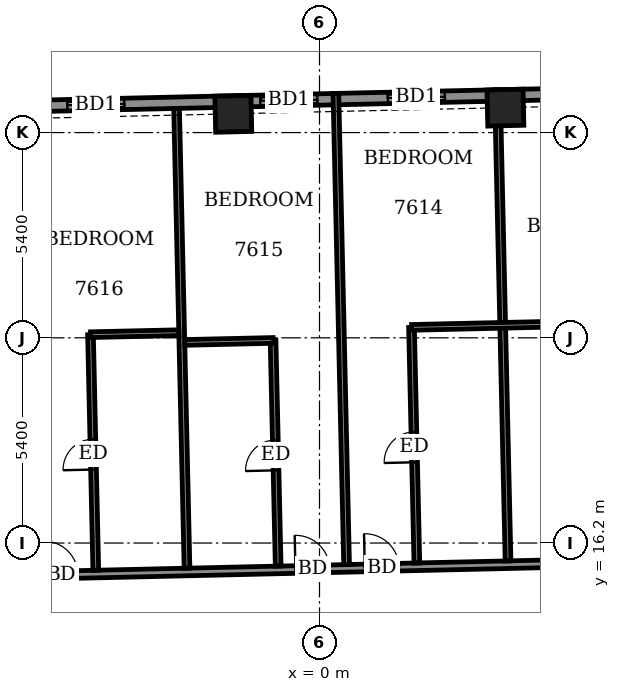
"""IFC4 building model, lengths in metres.
Left out: names, types, materials, properties, quantities, classifications, styles, units other than length and angle.
Written with IfcOpenShell. Run it as: python <this file> out.ifc"""

import sys

from ifc_helpers import new_model, si_unit, direction, frame, frame_2d, origin, origin_2d, place, context, subcontext, project, spatial, rectangle, extrude, element, fill, save


model = new_model("IFC4")
c1 = context("Model", 3, precision=1e-05, world=origin(), true_north=direction((0.0, 1.0)))
c2 = subcontext(c1, "Body", "Model", "MODEL_VIEW")
j1 = project(units=[si_unit("LENGTHUNIT", "METRE"), si_unit("PLANEANGLEUNIT", "RADIAN")], contexts=[c1])
p1 = place(None, origin())
s1 = spatial("IfcSite", under=j1, at=p1, CompositionType="ELEMENT")
p2 = place(p1, origin())
s2 = spatial("IfcBuilding", under=s1, at=p2, CompositionType="ELEMENT")
p3 = place(p2, frame((0.0, 0.0, 297.9)))
s3 = spatial("IfcBuildingStorey", under=s2, at=p3, CompositionType="ELEMENT", Elevation=297.9)
for number, where, z_axis, x_axis in (
    (1, (4.892, 27.656, -0.55), (0.0, 0.0, 1.0), (-1.0, -0.023, 0.0)),
    (2, (-2.268, 27.494, -0.55), (0.0, 0.0, 1.0), (-1.0, -0.023, 0.0)),
):
    element("IfcColumn", number, at=place(p3, frame(where, z_axis=z_axis, x_axis=x_axis)), inside=s3, PredefinedType="COLUMN", context=c2, shape_type="SweptSolid", body=[
        extrude(rectangle(XDim=0.95, YDim=0.95, at=origin_2d()), origin(), (0.0, 0.0, 1.0), 3.6),
    ])
p4 = place(p3, frame((26.216, 28.465, 0.0), z_axis=(0.0, 0.0, 1.0), x_axis=(-0.999742843677, -0.022677004157, 0.0)))
e3 = element("IfcWall", 3, at=p4, inside=s3, PredefinedType="SOLIDWALL", context=c2, shape_type="SweptSolid", body=[
    extrude(rectangle(XDim=49.836, YDim=0.3, at=frame_2d((24.918, 0.0))), origin(), (0.0, 0.0, 1.0), 2.5),
])
p5 = place(p4, frame((1.763, 0.0, 0.0)))
e4 = element("IfcOpeningElement", 4, at=p5, cuts=e3, PredefinedType="OPENING", context=c2, shape_type="SweptSolid", body=[
    extrude(rectangle(XDim=1.5, YDim=2.4, at=frame_2d((0.75, 1.2))), frame((0.0, 0.16, 0.0), z_axis=(0.0, -1.0, 0.0), x_axis=(1.0, 0.0, 0.0)), (0.0, 0.0, 1.0), 0.32),
])
p6 = place(p4, frame((4.912, 0.0, 0.0)))
e5 = element("IfcOpeningElement", 5, at=p6, cuts=e3, PredefinedType="OPENING", context=c2, shape_type="SweptSolid", body=[
    extrude(rectangle(XDim=1.5, YDim=2.4, at=frame_2d((0.75, 1.2))), frame((0.0, 0.16, 0.0), z_axis=(0.0, -1.0, 0.0), x_axis=(1.0, 0.0, 0.0)), (0.0, 0.0, 1.0), 0.32),
])
p7 = place(p4, frame((10.186, 0.0, 0.0)))
e6 = element("IfcOpeningElement", 6, at=p7, cuts=e3, PredefinedType="OPENING", context=c2, shape_type="SweptSolid", body=[
    extrude(rectangle(XDim=1.5, YDim=2.4, at=frame_2d((0.75, 1.2))), frame((0.0, 0.16, 0.0), z_axis=(0.0, -1.0, 0.0), x_axis=(1.0, 0.0, 0.0)), (0.0, 0.0, 1.0), 0.32),
])
p8 = place(p4, frame((15.093, 0.0, 0.0)))
e7 = element("IfcOpeningElement", 7, at=p8, cuts=e3, PredefinedType="OPENING", context=c2, shape_type="SweptSolid", body=[
    extrude(rectangle(XDim=1.5, YDim=2.4, at=frame_2d((0.75, 1.2))), frame((0.0, 0.16, 0.0), z_axis=(0.0, -1.0, 0.0), x_axis=(1.0, 0.0, 0.0)), (0.0, 0.0, 1.0), 0.32),
])
p9 = place(p4, frame((18.449, 0.0, 0.0)))
e8 = element("IfcOpeningElement", 8, at=p9, cuts=e3, PredefinedType="OPENING", context=c2, shape_type="SweptSolid", body=[
    extrude(rectangle(XDim=1.5, YDim=2.4, at=frame_2d((0.75, 1.2))), frame((0.0, 0.16, 0.0), z_axis=(0.0, -1.0, 0.0), x_axis=(1.0, 0.0, 0.0)), (0.0, 0.0, 1.0), 0.32),
])
p10 = place(p4, frame((22.924, 0.0, 0.0)))
e9 = element("IfcOpeningElement", 9, at=p10, cuts=e3, PredefinedType="OPENING", context=c2, shape_type="SweptSolid", body=[
    extrude(rectangle(XDim=1.5, YDim=2.4, at=frame_2d((0.75, 1.2))), frame((0.0, 0.16, 0.0), z_axis=(0.0, -1.0, 0.0), x_axis=(1.0, 0.0, 0.0)), (0.0, 0.0, 1.0), 0.32),
])
p11 = place(p4, frame((26.28, 0.0, 0.0)))
e10 = element("IfcOpeningElement", 10, at=p11, cuts=e3, PredefinedType="OPENING", context=c2, shape_type="SweptSolid", body=[
    extrude(rectangle(XDim=1.5, YDim=2.4, at=frame_2d((0.75, 1.2))), frame((0.0, 0.16, 0.0), z_axis=(0.0, -1.0, 0.0), x_axis=(1.0, 0.0, 0.0)), (0.0, 0.0, 1.0), 0.32),
])
p12 = place(p4, frame((31.361, 0.0, 0.0)))
e11 = element("IfcOpeningElement", 11, at=p12, cuts=e3, PredefinedType="OPENING", context=c2, shape_type="SweptSolid", body=[
    extrude(rectangle(XDim=1.5, YDim=2.4, at=frame_2d((0.75, 1.2))), frame((0.0, 0.16, 0.0), z_axis=(0.0, -1.0, 0.0), x_axis=(1.0, 0.0, 0.0)), (0.0, 0.0, 1.0), 0.32),
])
p13 = place(p4, frame((36.437, 0.0, 0.0)))
e12 = element("IfcOpeningElement", 12, at=p13, cuts=e3, PredefinedType="OPENING", context=c2, shape_type="SweptSolid", body=[
    extrude(rectangle(XDim=1.5, YDim=2.4, at=frame_2d((0.75, 1.2))), frame((0.0, 0.16, 0.0), z_axis=(0.0, -1.0, 0.0), x_axis=(1.0, 0.0, 0.0)), (0.0, 0.0, 1.0), 0.32),
])
p14 = place(p4, frame((39.793, 0.0, 0.0)))
e13 = element("IfcOpeningElement", 13, at=p14, cuts=e3, PredefinedType="OPENING", context=c2, shape_type="SweptSolid", body=[
    extrude(rectangle(XDim=1.5, YDim=2.4, at=frame_2d((0.75, 1.2))), frame((0.0, 0.16, 0.0), z_axis=(0.0, -1.0, 0.0), x_axis=(1.0, 0.0, 0.0)), (0.0, 0.0, 1.0), 0.32),
])
p15 = place(p4, frame((44.267, 0.0, 0.0)))
e14 = element("IfcOpeningElement", 14, at=p15, cuts=e3, PredefinedType="OPENING", context=c2, shape_type="SweptSolid", body=[
    extrude(rectangle(XDim=1.5, YDim=2.4, at=frame_2d((0.75, 1.2))), frame((0.0, 0.16, 0.0), z_axis=(0.0, -1.0, 0.0), x_axis=(1.0, 0.0, 0.0)), (0.0, 0.0, 1.0), 0.32),
])
p16 = place(p4, frame((47.524, 0.0, 0.9)))
e15 = element("IfcOpeningElement", 15, at=p16, cuts=e3, PredefinedType="OPENING", context=c2, shape_type="SweptSolid", body=[
    extrude(rectangle(XDim=1.2, YDim=1.5, at=frame_2d((0.6, 0.75))), frame((0.0, 0.16, 0.0), z_axis=(0.0, -1.0, 0.0), x_axis=(1.0, 0.0, 0.0)), (0.0, 0.0, 1.0), 0.32),
])
p17 = place(p3, frame((-26.401, 14.918, 0.0), z_axis=(0.0, 0.0, 1.0), x_axis=(0.99974239733, 0.022696673341, 0.0)))
e16 = element("IfcWall", 16, at=p17, inside=s3, PredefinedType="PARTITIONING", context=c2, shape_type="SweptSolid", body=[
    extrude(rectangle(XDim=55.386, YDim=0.2, at=frame_2d((27.693, 0.0))), origin(), (0.0, 0.0, 1.0), 3.05),
])
p18 = place(p17, frame((53.718, 0.0, 0.0)))
e17 = element("IfcOpeningElement", 17, at=p18, cuts=e16, PredefinedType="OPENING", context=c2, shape_type="SweptSolid", body=[
    extrude(rectangle(XDim=1.0, YDim=2.1, at=frame_2d((0.5, 1.05))), frame((0.0, 0.11, 0.0), z_axis=(0.0, -1.0, 0.0), x_axis=(1.0, 0.0, 0.0)), (0.0, 0.0, 1.0), 0.22),
])
p19 = place(p17, frame((49.325, 0.0, 0.0)))
e18 = element("IfcOpeningElement", 18, at=p19, cuts=e16, PredefinedType="OPENING", context=c2, shape_type="SweptSolid", body=[
    extrude(rectangle(XDim=0.9, YDim=2.1, at=frame_2d((0.45, 1.05))), frame((0.0, 0.11, 0.0), z_axis=(0.0, -1.0, 0.0), x_axis=(1.0, 0.0, 0.0)), (0.0, 0.0, 1.0), 0.22),
])
p20 = place(p17, frame((44.575, 0.0, 0.0)))
e19 = element("IfcOpeningElement", 19, at=p20, cuts=e16, PredefinedType="OPENING", context=c2, shape_type="SweptSolid", body=[
    extrude(rectangle(XDim=0.9, YDim=2.1, at=frame_2d((0.45, 1.05))), frame((0.0, 0.11, 0.0), z_axis=(0.0, -1.0, 0.0), x_axis=(1.0, 0.0, 0.0)), (0.0, 0.0, 1.0), 0.22),
])
p21 = place(p17, frame((42.725, 0.0, 0.0)))
e20 = element("IfcOpeningElement", 20, at=p21, cuts=e16, PredefinedType="OPENING", context=c2, shape_type="SweptSolid", body=[
    extrude(rectangle(XDim=0.9, YDim=2.1, at=frame_2d((0.45, 1.05))), frame((0.0, 0.11, 0.0), z_axis=(0.0, -1.0, 0.0), x_axis=(1.0, 0.0, 0.0)), (0.0, 0.0, 1.0), 0.22),
])
p22 = place(p17, frame((36.1, 0.0, 0.0)))
e21 = element("IfcOpeningElement", 21, at=p22, cuts=e16, PredefinedType="OPENING", context=c2, shape_type="SweptSolid", body=[
    extrude(rectangle(XDim=0.9, YDim=2.1, at=frame_2d((0.45, 1.05))), frame((0.0, 0.11, 0.0), z_axis=(0.0, -1.0, 0.0), x_axis=(1.0, 0.0, 0.0)), (0.0, 0.0, 1.0), 0.22),
])
p23 = place(p17, frame((34.25, 0.0, 0.0)))
e22 = element("IfcOpeningElement", 22, at=p23, cuts=e16, PredefinedType="OPENING", context=c2, shape_type="SweptSolid", body=[
    extrude(rectangle(XDim=0.9, YDim=2.1, at=frame_2d((0.45, 1.05))), frame((0.0, 0.11, 0.0), z_axis=(0.0, -1.0, 0.0), x_axis=(1.0, 0.0, 0.0)), (0.0, 0.0, 1.0), 0.22),
])
p24 = place(p17, frame((27.6, 0.0, 0.0)))
e23 = element("IfcOpeningElement", 23, at=p24, cuts=e16, PredefinedType="OPENING", context=c2, shape_type="SweptSolid", body=[
    extrude(rectangle(XDim=0.9, YDim=2.1, at=frame_2d((0.45, 1.05))), frame((0.0, 0.11, 0.0), z_axis=(0.0, -1.0, 0.0), x_axis=(1.0, 0.0, 0.0)), (0.0, 0.0, 1.0), 0.22),
])
p25 = place(p17, frame((25.775, 0.0, 0.0)))
e24 = element("IfcOpeningElement", 24, at=p25, cuts=e16, PredefinedType="OPENING", context=c2, shape_type="SweptSolid", body=[
    extrude(rectangle(XDim=0.9, YDim=2.1, at=frame_2d((0.45, 1.05))), frame((0.0, 0.11, 0.0), z_axis=(0.0, -1.0, 0.0), x_axis=(1.0, 0.0, 0.0)), (0.0, 0.0, 1.0), 0.22),
])
p26 = place(p17, frame((19.15, 0.0, 0.0)))
e25 = element("IfcOpeningElement", 25, at=p26, cuts=e16, PredefinedType="OPENING", context=c2, shape_type="SweptSolid", body=[
    extrude(rectangle(XDim=0.9, YDim=2.1, at=frame_2d((0.45, 1.05))), frame((0.0, 0.11, 0.0), z_axis=(0.0, -1.0, 0.0), x_axis=(1.0, 0.0, 0.0)), (0.0, 0.0, 1.0), 0.22),
])
p27 = place(p17, frame((17.3, 0.0, 0.0)))
e26 = element("IfcOpeningElement", 26, at=p27, cuts=e16, PredefinedType="OPENING", context=c2, shape_type="SweptSolid", body=[
    extrude(rectangle(XDim=0.9, YDim=2.1, at=frame_2d((0.45, 1.05))), frame((0.0, 0.11, 0.0), z_axis=(0.0, -1.0, 0.0), x_axis=(1.0, 0.0, 0.0)), (0.0, 0.0, 1.0), 0.22),
])
p28 = place(p17, frame((10.65, 0.0, 0.0)))
e27 = element("IfcOpeningElement", 27, at=p28, cuts=e16, PredefinedType="OPENING", context=c2, shape_type="SweptSolid", body=[
    extrude(rectangle(XDim=0.9, YDim=2.1, at=frame_2d((0.45, 1.05))), frame((0.0, 0.11, 0.0), z_axis=(0.0, -1.0, 0.0), x_axis=(1.0, 0.0, 0.0)), (0.0, 0.0, 1.0), 0.22),
])
p29 = place(p17, frame((8.8, 0.0, 0.0)))
e28 = element("IfcOpeningElement", 28, at=p29, cuts=e16, PredefinedType="OPENING", context=c2, shape_type="SweptSolid", body=[
    extrude(rectangle(XDim=0.9, YDim=2.1, at=frame_2d((0.45, 1.05))), frame((0.0, 0.11, 0.0), z_axis=(0.0, -1.0, 0.0), x_axis=(1.0, 0.0, 0.0)), (0.0, 0.0, 1.0), 0.22),
])
p30 = place(p17, frame((1.864, 0.0, 0.0)))
e29 = element("IfcOpeningElement", 29, at=p30, cuts=e16, PredefinedType="OPENING", context=c2, shape_type="SweptSolid", body=[
    extrude(rectangle(XDim=1.0, YDim=2.1, at=frame_2d((0.5, 1.05))), frame((0.0, 0.11, 0.0), z_axis=(0.0, -1.0, 0.0), x_axis=(1.0, 0.0, 0.0)), (0.0, 0.0, 1.0), 0.22),
])
p31 = place(p3, frame((-5.886, 15.484, 0.0), z_axis=(0.0, 0.0, 1.0), x_axis=(-0.022564860101, 0.999745381129, 0.0)))
e30 = element("IfcWall", 30, at=p31, inside=s3, PredefinedType="PARTITIONING", context=c2, shape_type="SweptSolid", body=[
    extrude(rectangle(XDim=6.199, YDim=0.15, at=frame_2d((3.1, 0.0))), origin(), (0.0, 0.0, 1.0), 3.05),
])
p32 = place(p31, frame((2.65, 0.0, 0.0)))
e31 = element("IfcOpeningElement", 31, at=p32, cuts=e30, PredefinedType="OPENING", context=c2, shape_type="SweptSolid", body=[
    extrude(rectangle(XDim=0.8, YDim=2.1, at=frame_2d((0.4, 1.05))), frame((0.0, 0.085, 0.0), z_axis=(0.0, -1.0, 0.0), x_axis=(1.0, 0.0, 0.0)), (0.0, 0.0, 1.0), 0.17),
])
p33 = place(p3, frame((-3.486, 15.538, 0.0), z_axis=(0.0, 0.0, 1.0), x_axis=(-0.022719113715, 0.999741887625, 0.0)))
e32 = element("IfcWall", 32, at=p33, inside=s3, PredefinedType="PARTITIONING", context=c2, shape_type="SweptSolid", body=[
    extrude(rectangle(XDim=12.1, YDim=0.15, at=frame_2d((6.05, 0.0))), origin(), (0.0, 0.0, 1.0), 2.5),
])
p34 = place(p3, frame((-1.087, 15.593, 0.0), z_axis=(0.0, 0.0, 1.0), x_axis=(-0.022730742442, 0.999741623295, 0.0)))
e33 = element("IfcWall", 33, at=p34, inside=s3, PredefinedType="PARTITIONING", context=c2, shape_type="SweptSolid", body=[
    extrude(rectangle(XDim=5.939, YDim=0.15, at=frame_2d((2.97, 0.0))), origin(), (0.0, 0.0, 1.0), 3.05),
])
p35 = place(p34, frame((2.52, 0.0, 0.0)))
e34 = element("IfcOpeningElement", 34, at=p35, cuts=e33, PredefinedType="OPENING", context=c2, shape_type="SweptSolid", body=[
    extrude(rectangle(XDim=0.8, YDim=2.1, at=frame_2d((0.4, 1.05))), frame((0.0, 0.085, 0.0), z_axis=(0.0, -1.0, 0.0), x_axis=(1.0, 0.0, 0.0)), (0.0, 0.0, 1.0), 0.17),
])
p36 = place(p3, frame((0.713, 15.633, 0.0), z_axis=(0.0, 0.0, 1.0), x_axis=(-0.022740189192, 0.999741408463, 0.0)))
e35 = element("IfcWall", 35, at=p36, inside=s3, PredefinedType="PARTITIONING", context=c2, shape_type="SweptSolid", body=[
    extrude(rectangle(XDim=12.4, YDim=0.15, at=frame_2d((6.2, 0.0))), origin(), (0.0, 0.0, 1.0), 2.5),
])
p37 = place(p3, frame((2.562, 15.675, 0.0), z_axis=(0.0, 0.0, 1.0), x_axis=(-0.02275807565, 0.999741001456, 0.0)))
e36 = element("IfcWall", 36, at=p37, inside=s3, PredefinedType="PARTITIONING", context=c2, shape_type="SweptSolid", body=[
    extrude(rectangle(XDim=6.201, YDim=0.15, at=frame_2d((3.1, 0.0))), origin(), (0.0, 0.0, 1.0), 3.05),
])
p38 = place(p37, frame((2.65, 0.0, 0.0)))
e37 = element("IfcOpeningElement", 37, at=p38, cuts=e36, PredefinedType="OPENING", context=c2, shape_type="SweptSolid", body=[
    extrude(rectangle(XDim=0.8, YDim=2.1, at=frame_2d((0.4, 1.05))), frame((0.0, 0.085, 0.0), z_axis=(0.0, -1.0, 0.0), x_axis=(1.0, 0.0, 0.0)), (0.0, 0.0, 1.0), 0.17),
])
p39 = place(p3, frame((4.961, 15.73, 0.0), z_axis=(0.0, 0.0, 1.0), x_axis=(-0.022661475803, 0.999743195783, 0.0)))
e38 = element("IfcWall", 38, at=p39, inside=s3, PredefinedType="PARTITIONING", context=c2, shape_type="SweptSolid", body=[
    extrude(rectangle(XDim=12.4, YDim=0.15, at=frame_2d((6.2, 0.0))), origin(), (0.0, 0.0, 1.0), 3.05),
])
for number, where, z_axis, x_axis in (
    (39, (-3.544, 21.478, 0.0), (0.0, 0.0, 1.0), (1.0, 0.023, 0.0)),
    (40, (-6.024, 21.682, 0.0), (0.0, 0.0, 1.0), (1.0, 0.023, 0.0)),
):
    element("IfcWall", number, at=place(p3, frame(where, z_axis=z_axis, x_axis=x_axis)), inside=s3, PredefinedType="PARTITIONING", context=c2, shape_type="SweptSolid", body=[
        extrude(rectangle(XDim=2.324, YDim=0.15, at=frame_2d((1.162, 0.0))), origin(), (0.0, 0.0, 1.0), 3.05),
    ])
p40 = place(p3, frame((2.423, 21.874, 0.0), z_axis=(0.0, 0.0, 1.0), x_axis=(0.999742675121, 0.022684433919, 0.0)))
e41 = element("IfcWall", 41, at=p40, inside=s3, PredefinedType="PARTITIONING", context=c2, shape_type="SweptSolid", body=[
    extrude(rectangle(XDim=4.8, YDim=0.15, at=frame_2d((2.4, 0.0))), origin(), (0.0, 0.0, 1.0), 3.05),
])
p41 = place(p10, origin())
e42 = element("IfcDoor", 42, at=p41, inside=s3, OperationType="SLIDING_TO_LEFT", PredefinedType="DOOR", context=c2, shape_type="SweptSolid", body=[
    extrude(rectangle(XDim=1.5, YDim=2.4, at=frame_2d((0.75, 1.2))), frame((0.0, 0.025, 0.0), z_axis=(0.0, -1.0, 0.0), x_axis=(1.0, 0.0, 0.0)), (0.0, 0.0, 1.0), 0.05),
])
fill(e9, e42)
p42 = place(p11, origin())
e43 = element("IfcDoor", 43, at=p42, inside=s3, OperationType="SLIDING_TO_LEFT", PredefinedType="DOOR", context=c2, shape_type="SweptSolid", body=[
    extrude(rectangle(XDim=1.5, YDim=2.4, at=frame_2d((0.75, 1.2))), frame((0.0, 0.025, 0.0), z_axis=(0.0, -1.0, 0.0), x_axis=(1.0, 0.0, 0.0)), (0.0, 0.0, 1.0), 0.05),
])
fill(e10, e43)
p43 = place(p12, origin())
e44 = element("IfcDoor", 44, at=p43, inside=s3, OperationType="SLIDING_TO_LEFT", PredefinedType="DOOR", context=c2, shape_type="SweptSolid", body=[
    extrude(rectangle(XDim=1.5, YDim=2.4, at=frame_2d((0.75, 1.2))), frame((0.0, 0.025, 0.0), z_axis=(0.0, -1.0, 0.0), x_axis=(1.0, 0.0, 0.0)), (0.0, 0.0, 1.0), 0.05),
])
fill(e11, e44)
p44 = place(p24, origin())
e45 = element("IfcDoor", 45, at=p44, inside=s3, OperationType="SINGLE_SWING_RIGHT", PredefinedType="DOOR", context=c2, shape_type="SweptSolid", body=[
    extrude(rectangle(XDim=0.9, YDim=2.1, at=frame_2d((0.45, 1.05))), frame((0.0, 0.025, 0.0), z_axis=(0.0, -1.0, 0.0), x_axis=(1.0, 0.0, 0.0)), (0.0, 0.0, 1.0), 0.05),
])
fill(e23, e45)
p45 = place(p38, origin())
e46 = element("IfcDoor", 46, at=p45, inside=s3, OperationType="SINGLE_SWING_RIGHT", PredefinedType="DOOR", context=c2, shape_type="SweptSolid", body=[
    extrude(rectangle(XDim=0.8, YDim=2.1, at=frame_2d((0.4, 1.05))), frame((0.0, 0.025, 0.0), z_axis=(0.0, -1.0, 0.0), x_axis=(1.0, 0.0, 0.0)), (0.0, 0.0, 1.0), 0.05),
])
fill(e37, e46)
p46 = place(p25, origin())
e47 = element("IfcDoor", 47, at=p46, inside=s3, OperationType="SINGLE_SWING_LEFT", PredefinedType="DOOR", context=c2, shape_type="SweptSolid", body=[
    extrude(rectangle(XDim=0.9, YDim=2.1, at=frame_2d((0.45, 1.05))), frame((0.0, 0.025, 0.0), z_axis=(0.0, -1.0, 0.0), x_axis=(1.0, 0.0, 0.0)), (0.0, 0.0, 1.0), 0.05),
])
fill(e24, e47)
p47 = place(p35, origin())
e48 = element("IfcDoor", 48, at=p47, inside=s3, OperationType="SINGLE_SWING_LEFT", PredefinedType="DOOR", context=c2, shape_type="SweptSolid", body=[
    extrude(rectangle(XDim=0.8, YDim=2.1, at=frame_2d((0.4, 1.05))), frame((0.0, 0.025, 0.0), z_axis=(0.0, -1.0, 0.0), x_axis=(1.0, 0.0, 0.0)), (0.0, 0.0, 1.0), 0.05),
])
fill(e34, e48)
p48 = place(p26, origin())
e49 = element("IfcDoor", 49, at=p48, inside=s3, OperationType="SINGLE_SWING_RIGHT", PredefinedType="DOOR", context=c2, shape_type="SweptSolid", body=[
    extrude(rectangle(XDim=0.9, YDim=2.1, at=frame_2d((0.45, 1.05))), frame((0.0, 0.025, 0.0), z_axis=(0.0, -1.0, 0.0), x_axis=(1.0, 0.0, 0.0)), (0.0, 0.0, 1.0), 0.05),
])
fill(e25, e49)
p49 = place(p32, origin())
e50 = element("IfcDoor", 50, at=p49, inside=s3, OperationType="SINGLE_SWING_RIGHT", PredefinedType="DOOR", context=c2, shape_type="SweptSolid", body=[
    extrude(rectangle(XDim=0.8, YDim=2.1, at=frame_2d((0.4, 1.05))), frame((0.0, 0.025, 0.0), z_axis=(0.0, -1.0, 0.0), x_axis=(1.0, 0.0, 0.0)), (0.0, 0.0, 1.0), 0.05),
])
fill(e31, e50)
save(model, sys.argv[1])
